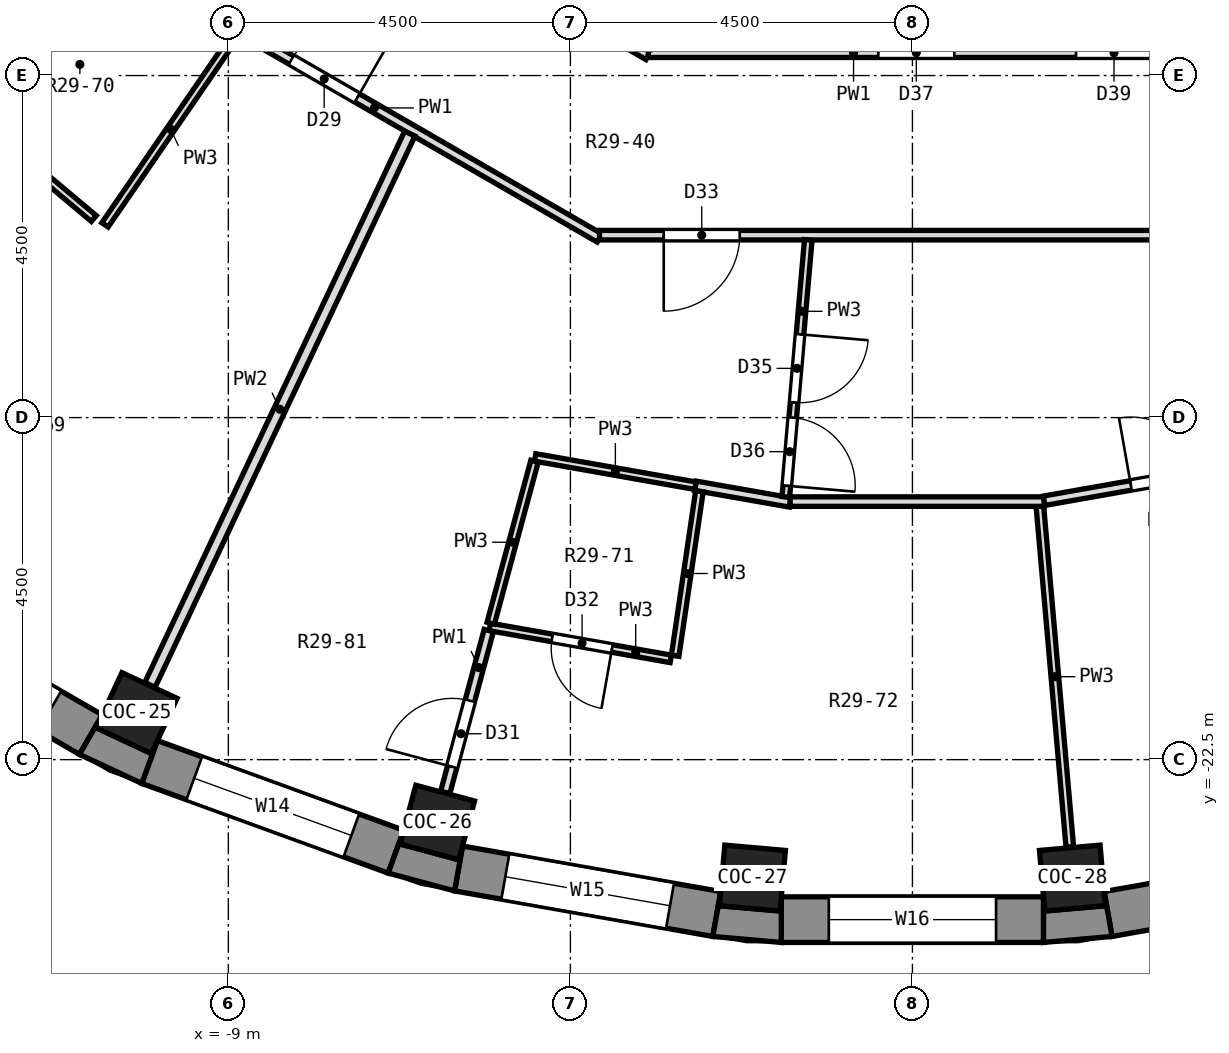
"""IFC4 building model, lengths in metres.
Left out: names, types, materials, properties, quantities, classifications, styles, units other than length and angle.
Written with IfcOpenShell. Run it as: python <this file> out.ifc"""

import sys

from ifc_helpers import new_model, si_unit, direction, frame, frame_2d, origin, origin_2d, place, context, subcontext, project, spatial, polyline, rectangle, outline, extrude, element, fill, save


model = new_model("IFC4")
c1 = context("Model", 3, precision=1e-05, world=origin(), true_north=direction((0.0, 1.0)))
c2 = subcontext(c1, "Body", "Model", "MODEL_VIEW")
j1 = project(units=[si_unit("LENGTHUNIT", "METRE"), si_unit("PLANEANGLEUNIT", "RADIAN")], contexts=[c1])
p1 = place(None, origin())
s1 = spatial("IfcSite", under=j1, at=p1, CompositionType="ELEMENT")
p2 = place(p1, origin())
s2 = spatial("IfcBuilding", under=s1, at=p2, CompositionType="ELEMENT")
p3 = place(p2, frame((0.0, 0.0, 200.4)))
s3 = spatial("IfcBuildingStorey", under=s2, at=p3, CompositionType="ELEMENT", Elevation=200.4)
for number, where, z_axis, x_axis in (
    (1, (-10.206, -21.887, 0.0), (0.0, 0.0, 1.0), (-0.423, -0.906, 0.0)),
    (2, (-6.25, -23.327, 0.0), (0.0, 0.0, 1.0), (-0.259, -0.966, 0.0)),
    (3, (-2.105, -24.058, 0.0), (0.0, 0.0, 1.0), (-0.087, -0.996, 0.0)),
    (4, (2.105, -24.058, 0.0), (0.0, 0.0, 1.0), (0.087, -0.996, 0.0)),
):
    element("IfcColumn", number, at=place(p3, frame(where, z_axis=z_axis, x_axis=x_axis)), inside=s3, PredefinedType="COLUMN", context=c2, shape_type="SweptSolid", body=[
        extrude(rectangle(XDim=0.8, YDim=0.8, at=origin_2d()), origin(), (0.0, 0.0, 1.0), 3.3),
    ])
p4 = place(p3, frame((-13.796, -20.446, 0.0), z_axis=(0.0, 0.0, 1.0), x_axis=(0.86602648383, -0.499998129301, 0.0)))
e5 = element("IfcWall", 5, at=p4, inside=s3, PredefinedType="SOLIDWALL", context=c2, shape_type="SweptSolid", body=[
    extrude(rectangle(XDim=3.45, YDim=0.6, at=frame_2d((1.725, 0.0))), origin(), (0.0, 0.0, 1.0), 2.85),
])
p5 = place(p4, frame((0.625, 0.0, 0.9)))
e6 = element("IfcOpeningElement", 6, at=p5, cuts=e5, PredefinedType="OPENING", context=c2, shape_type="SweptSolid", body=[
    extrude(rectangle(XDim=2.2, YDim=1.8, at=frame_2d((1.1, 0.9))), frame((0.0, 0.312, 0.0), z_axis=(0.0, -1.0, 0.0), x_axis=(1.0, 0.0, 0.0)), (0.0, 0.0, 1.0), 0.624),
])
p6 = place(p3, frame((-10.036, -22.531, 0.0), z_axis=(0.0, 0.0, 1.0), x_axis=(0.93968799822, -0.342032843455, 0.0)))
e7 = element("IfcWall", 7, at=p6, inside=s3, PredefinedType="SOLIDWALL", context=c2, shape_type="SweptSolid", body=[
    extrude(rectangle(XDim=3.45, YDim=0.6, at=frame_2d((1.725, 0.0))), origin(), (0.0, 0.0, 1.0), 2.85),
])
p7 = place(p6, frame((0.625, 0.0, 0.9)))
e8 = element("IfcOpeningElement", 8, at=p7, cuts=e7, PredefinedType="OPENING", context=c2, shape_type="SweptSolid", body=[
    extrude(rectangle(XDim=2.2, YDim=1.8, at=frame_2d((1.1, 0.9))), frame((0.0, 0.312, 0.0), z_axis=(0.0, -1.0, 0.0), x_axis=(1.0, 0.0, 0.0)), (0.0, 0.0, 1.0), 0.624),
])
p8 = place(p3, frame((-5.971, -23.932, 0.0), z_axis=(0.0, 0.0, 1.0), x_axis=(0.984814892183, -0.173607684551, 0.0)))
e9 = element("IfcWall", 9, at=p8, inside=s3, PredefinedType="SOLIDWALL", context=c2, shape_type="SweptSolid", body=[
    extrude(rectangle(XDim=3.45, YDim=0.6, at=frame_2d((1.725, 0.0))), origin(), (0.0, 0.0, 1.0), 2.85),
])
p9 = place(p8, frame((0.625, 0.0, 0.9)))
e10 = element("IfcOpeningElement", 10, at=p9, cuts=e9, PredefinedType="OPENING", context=c2, shape_type="SweptSolid", body=[
    extrude(rectangle(XDim=2.2, YDim=1.8, at=frame_2d((1.1, 0.9))), frame((0.0, 0.312, 0.0), z_axis=(0.0, -1.0, 0.0), x_axis=(1.0, 0.0, 0.0)), (0.0, 0.0, 1.0), 0.624),
])
p10 = place(p3, frame((-1.725, -24.605, 0.0), z_axis=(0.0, 0.0, 1.0), x_axis=(1.0, 0.0, 0.0)))
e11 = element("IfcWall", 11, at=p10, inside=s3, PredefinedType="SOLIDWALL", context=c2, shape_type="SweptSolid", body=[
    extrude(rectangle(XDim=3.45, YDim=0.6, at=frame_2d((1.725, 0.0))), origin(), (0.0, 0.0, 1.0), 2.85),
])
p11 = place(p10, frame((0.625, 0.0, 0.9)))
e12 = element("IfcOpeningElement", 12, at=p11, cuts=e11, PredefinedType="OPENING", context=c2, shape_type="SweptSolid", body=[
    extrude(rectangle(XDim=2.2, YDim=1.8, at=frame_2d((1.1, 0.9))), frame((0.0, 0.312, 0.0), z_axis=(0.0, -1.0, 0.0), x_axis=(1.0, 0.0, 0.0)), (0.0, 0.0, 1.0), 0.624),
])
p12 = place(p3, frame((2.574, -24.531, 0.0), z_axis=(0.0, 0.0, 1.0), x_axis=(0.984814892183, 0.173607684551, 0.0)))
e13 = element("IfcWall", 13, at=p12, inside=s3, PredefinedType="SOLIDWALL", context=c2, shape_type="SweptSolid", body=[
    extrude(rectangle(XDim=3.45, YDim=0.6, at=frame_2d((1.725, 0.0))), origin(), (0.0, 0.0, 1.0), 2.85),
])
p13 = place(p12, frame((0.625, 0.0, 0.9)))
e14 = element("IfcOpeningElement", 14, at=p13, cuts=e13, PredefinedType="OPENING", context=c2, shape_type="SweptSolid", body=[
    extrude(rectangle(XDim=2.2, YDim=1.8, at=frame_2d((1.1, 0.9))), frame((0.0, 0.312, 0.0), z_axis=(0.0, -1.0, 0.0), x_axis=(1.0, 0.0, 0.0)), (0.0, 0.0, 1.0), 0.624),
])
p14 = place(p3, origin())
e15 = element("IfcWall", 15, at=p14, inside=s3, PredefinedType="SOLIDWALL", context=c2, shape_type="SweptSolid", body=[
    extrude(outline(polyline([(-10.139, -22.813), (-9.934, -22.249), (-10.013, -22.419), (-10.738, -22.081), (-10.659, -21.911), (-10.959, -22.431), (-10.139, -22.813)])), origin(), (0.0, 0.0, 1.0), 2.85),
])
p15 = place(p3, origin())
e16 = element("IfcWall", 16, at=p15, inside=s3, PredefinedType="SOLIDWALL", context=c2, shape_type="SweptSolid", body=[
    extrude(outline(polyline([(-6.023, -24.227), (-5.919, -23.636), (-5.968, -23.817), (-6.74, -23.61), (-6.692, -23.429), (-6.897, -23.993), (-6.023, -24.227)])), origin(), (0.0, 0.0, 1.0), 2.85),
])
p16 = place(p3, origin())
e17 = element("IfcWall", 17, at=p16, inside=s3, PredefinedType="SOLIDWALL", context=c2, shape_type="SweptSolid", body=[
    extrude(outline(polyline([(-2.626, -24.826), (-1.725, -24.905), (-1.725, -24.305), (-1.741, -24.491), (-2.538, -24.422), (-2.522, -24.235), (-2.626, -24.826)])), origin(), (0.0, 0.0, 1.0), 2.85),
])
p17 = place(p3, origin())
e18 = element("IfcWall", 18, at=p17, inside=s3, PredefinedType="SOLIDWALL", context=c2, shape_type="SweptSolid", body=[
    extrude(outline(polyline([(1.725, -24.905), (2.626, -24.826), (2.522, -24.235), (2.538, -24.422), (1.741, -24.491), (1.725, -24.305), (1.725, -24.905)])), origin(), (0.0, 0.0, 1.0), 2.85),
])
p18 = place(p3, frame((1.677, -19.167, 0.0), z_axis=(0.0, 0.0, 1.0), x_axis=(0.087521667832, -0.996162616072, 0.0)))
e19 = element("IfcWall", 19, at=p18, inside=s3, PredefinedType="PARTITIONING", context=c2, shape_type="SweptSolid", body=[
    extrude(rectangle(XDim=4.5, YDim=0.1, at=frame_2d((2.25, 0.0))), origin(), (0.0, 0.0, 1.0), 2.85),
])
p19 = place(p3, frame((-13.239, -13.309, 0.0), z_axis=(0.0, 0.0, 1.0), x_axis=(0.76596892519, -0.642877597714, 0.0)))
e20 = element("IfcWall", 20, at=p19, inside=s3, PredefinedType="PARTITIONING", context=c2, shape_type="SweptSolid", body=[
    extrude(rectangle(XDim=3.223, YDim=0.1, at=frame_2d((1.612, 0.0))), origin(), (0.0, 0.0, 1.0), 2.85),
])
p20 = place(p3, frame((-11.366, -11.451, 0.0), z_axis=(0.0, 0.0, 1.0), x_axis=(0.866023369196, -0.500003523994, 0.0)))
e21 = element("IfcWall", 21, at=p20, inside=s3, PredefinedType="PARTITIONING", context=c2, shape_type="SweptSolid", body=[
    extrude(rectangle(XDim=8.371, YDim=0.125, at=frame_2d((4.186, 0.0))), origin(), (0.0, 0.0, 1.0), 2.85),
])
p21 = place(p20, frame((0.966, 0.0, 0.0)))
e22 = element("IfcOpeningElement", 22, at=p21, cuts=e21, PredefinedType="OPENING", context=c2, shape_type="SweptSolid", body=[
    extrude(rectangle(XDim=0.9, YDim=2.1, at=frame_2d((0.45, 1.05))), frame((0.0, 0.074, 0.0), z_axis=(0.0, -1.0, 0.0), x_axis=(1.0, 0.0, 0.0)), (0.0, 0.0, 1.0), 0.149),
])
p22 = place(p20, frame((3.688, 0.0, 0.0)))
e23 = element("IfcOpeningElement", 23, at=p22, cuts=e21, PredefinedType="OPENING", context=c2, shape_type="SweptSolid", body=[
    extrude(rectangle(XDim=1.0, YDim=2.1, at=frame_2d((0.5, 1.05))), frame((0.0, 0.074, 0.0), z_axis=(0.0, -1.0, 0.0), x_axis=(1.0, 0.0, 0.0)), (0.0, 0.0, 1.0), 0.149),
])
p23 = place(p3, frame((-9.609, -9.694, 0.0), z_axis=(0.0, 0.0, 1.0), x_axis=(0.866017984103, -0.500012851046, 0.0)))
e24 = element("IfcWall", 24, at=p23, inside=s3, PredefinedType="PARTITIONING", context=c2, shape_type="SweptSolid", body=[
    extrude(rectangle(XDim=7.083, YDim=0.125, at=frame_2d((3.542, 0.0))), origin(), (0.0, 0.0, 1.0), 2.85),
])
p24 = place(p23, frame((2.923, 0.0, 0.0)))
e25 = element("IfcOpeningElement", 25, at=p24, cuts=e24, PredefinedType="OPENING", context=c2, shape_type="SweptSolid", body=[
    extrude(rectangle(XDim=1.0, YDim=2.1, at=frame_2d((0.5, 1.05))), frame((0.0, 0.074, 0.0), z_axis=(0.0, -1.0, 0.0), x_axis=(1.0, 0.0, 0.0)), (0.0, 0.0, 1.0), 0.149),
])
p25 = place(p3, frame((-5.561, -20.754, 0.0), z_axis=(0.0, 0.0, 1.0), x_axis=(0.984794734974, -0.173721990456, 0.0)))
e26 = element("IfcWall", 26, at=p25, inside=s3, PredefinedType="PARTITIONING", context=c2, shape_type="SweptSolid", body=[
    extrude(rectangle(XDim=2.419, YDim=0.1, at=frame_2d((1.209, 0.0))), origin(), (0.0, 0.0, 1.0), 2.85),
])
p26 = place(p25, frame((0.834, 0.0, 0.0)))
e27 = element("IfcOpeningElement", 27, at=p26, cuts=e26, PredefinedType="OPENING", context=c2, shape_type="SweptSolid", body=[
    extrude(rectangle(XDim=0.8, YDim=2.1, at=frame_2d((0.4, 1.05))), frame((0.0, 0.062, 0.0), z_axis=(0.0, -1.0, 0.0), x_axis=(1.0, 0.0, 0.0)), (0.0, 0.0, 1.0), 0.124),
])
p27 = place(p3, frame((-2.855, -18.897, 0.0), z_axis=(0.0, 0.0, 1.0), x_axis=(0.984944347712, -0.17287172097, 0.0)))
e28 = element("IfcWall", 28, at=p27, inside=s3, PredefinedType="PARTITIONING", context=c2, shape_type="SweptSolid", body=[
    extrude(rectangle(XDim=1.265, YDim=0.125, at=frame_2d((0.633, 0.0))), origin(), (0.0, 0.0, 1.0), 2.85),
])
p28 = place(p3, frame((-4.963, -18.524, 0.0), z_axis=(0.0, 0.0, 1.0), x_axis=(0.984783558818, -0.173785333909, 0.0)))
e29 = element("IfcWall", 29, at=p28, inside=s3, PredefinedType="PARTITIONING", context=c2, shape_type="SweptSolid", body=[
    extrude(rectangle(XDim=2.141, YDim=0.1, at=frame_2d((1.07, 0.0))), origin(), (0.0, 0.0, 1.0), 2.85),
])
p29 = place(p3, frame((-1.608, -19.105, 0.0), z_axis=(0.0, 0.0, 1.0), x_axis=(1.0, 0.0, 0.0)))
e30 = element("IfcWall", 30, at=p29, inside=s3, PredefinedType="PARTITIONING", context=c2, shape_type="SweptSolid", body=[
    extrude(rectangle(XDim=3.343, YDim=0.125, at=frame_2d((1.671, 0.0))), origin(), (0.0, 0.0, 1.0), 2.85),
])
p30 = place(p3, frame((-4.116, -15.6, 0.0), z_axis=(0.0, 0.0, 1.0), x_axis=(1.0, 0.0, 0.0)))
e31 = element("IfcWall", 31, at=p30, inside=s3, PredefinedType="PARTITIONING", context=c2, shape_type="SweptSolid", body=[
    extrude(rectangle(XDim=8.369, YDim=0.125, at=frame_2d((4.184, 0.0))), origin(), (0.0, 0.0, 1.0), 2.85),
])
p31 = place(p30, frame((0.844, 0.0, 0.0)))
e32 = element("IfcOpeningElement", 32, at=p31, cuts=e31, PredefinedType="OPENING", context=c2, shape_type="SweptSolid", body=[
    extrude(rectangle(XDim=1.0, YDim=2.1, at=frame_2d((0.5, 1.05))), frame((0.0, 0.074, 0.0), z_axis=(0.0, -1.0, 0.0), x_axis=(1.0, 0.0, 0.0)), (0.0, 0.0, 1.0), 0.149),
])
p32 = place(p3, frame((-3.475, -13.2, 0.0), z_axis=(0.0, 0.0, 1.0), x_axis=(1.0, 0.0, 0.0)))
e33 = element("IfcWall", 33, at=p32, inside=s3, PredefinedType="PARTITIONING", context=c2, shape_type="SweptSolid", body=[
    extrude(rectangle(XDim=7.084, YDim=0.125, at=frame_2d((3.542, 0.0))), origin(), (0.0, 0.0, 1.0), 2.85),
])
p33 = place(p32, frame((3.025, 0.0, 0.0)))
e34 = element("IfcOpeningElement", 34, at=p33, cuts=e33, PredefinedType="OPENING", context=c2, shape_type="SweptSolid", body=[
    extrude(rectangle(XDim=1.0, YDim=2.1, at=frame_2d((0.5, 1.05))), frame((0.0, 0.074, 0.0), z_axis=(0.0, -1.0, 0.0), x_axis=(1.0, 0.0, 0.0)), (0.0, 0.0, 1.0), 0.149),
])
p34 = place(p32, frame((5.626, 0.0, 0.0)))
e35 = element("IfcOpeningElement", 35, at=p34, cuts=e33, PredefinedType="OPENING", context=c2, shape_type="SweptSolid", body=[
    extrude(rectangle(XDim=1.0, YDim=2.1, at=frame_2d((0.5, 1.05))), frame((0.0, 0.074, 0.0), z_axis=(0.0, -1.0, 0.0), x_axis=(1.0, 0.0, 0.0)), (0.0, 0.0, 1.0), 0.149),
])
p35 = place(p3, frame((1.732, -19.094, 0.0), z_axis=(0.0, 0.0, 1.0), x_axis=(0.984782824009, 0.173789497774, 0.0)))
e36 = element("IfcWall", 36, at=p35, inside=s3, PredefinedType="PARTITIONING", context=c2, shape_type="SweptSolid", body=[
    extrude(rectangle(XDim=3.345, YDim=0.125, at=frame_2d((1.672, 0.0))), origin(), (0.0, 0.0, 1.0), 2.85),
])
p36 = place(p35, frame((1.159, 0.0, 0.0)))
e37 = element("IfcOpeningElement", 37, at=p36, cuts=e36, PredefinedType="OPENING", context=c2, shape_type="SweptSolid", body=[
    extrude(rectangle(XDim=0.9, YDim=2.1, at=frame_2d((0.45, 1.05))), frame((0.0, 0.074, 0.0), z_axis=(0.0, -1.0, 0.0), x_axis=(1.0, 0.0, 0.0)), (0.0, 0.0, 1.0), 0.149),
])
p37 = place(p3, frame((-10.623, -15.465, 0.0), z_axis=(0.0, 0.0, 1.0), x_axis=(0.566094144379, 0.824340596902, 0.0)))
e38 = element("IfcWall", 38, at=p37, inside=s3, PredefinedType="PARTITIONING", context=c2, shape_type="SweptSolid", body=[
    extrude(rectangle(XDim=3.052, YDim=0.1, at=frame_2d((1.526, 0.0))), origin(), (0.0, 0.0, 1.0), 2.85),
])
p38 = place(p3, frame((-10.031, -21.517, 0.0), z_axis=(0.0, 0.0, 1.0), x_axis=(0.426351254657, 0.904557686194, 0.0)))
e39 = element("IfcWall", 39, at=p38, inside=s3, PredefinedType="PARTITIONING", context=c2, shape_type="SweptSolid", body=[
    extrude(rectangle(XDim=8.018, YDim=0.15, at=frame_2d((4.009, 0.0))), origin(), (0.0, 0.0, 1.0), 2.85),
])
p39 = place(p3, frame((-5.548, -20.706, 0.0), z_axis=(0.0, 0.0, 1.0), x_axis=(0.260881182377, 0.965370917669, 0.0)))
e40 = element("IfcWall", 40, at=p39, inside=s3, PredefinedType="PARTITIONING", context=c2, shape_type="SweptSolid", body=[
    extrude(rectangle(XDim=2.208, YDim=0.1, at=frame_2d((1.104, 0.0))), origin(), (0.0, 0.0, 1.0), 2.85),
])
p40 = place(p3, frame((-6.146, -22.931, 0.0), z_axis=(0.0, 0.0, 1.0), x_axis=(0.259544407095, 0.965731174161, 0.0)))
e41 = element("IfcWall", 41, at=p40, inside=s3, PredefinedType="PARTITIONING", context=c2, shape_type="SweptSolid", body=[
    extrude(rectangle(XDim=2.204, YDim=0.125, at=frame_2d((1.102, 0.0))), origin(), (0.0, 0.0, 1.0), 2.85),
])
p41 = place(p40, frame((0.349, 0.0, 0.0)))
e42 = element("IfcOpeningElement", 42, at=p41, cuts=e41, PredefinedType="OPENING", context=c2, shape_type="SweptSolid", body=[
    extrude(rectangle(XDim=0.9, YDim=2.1, at=frame_2d((0.45, 1.05))), frame((0.0, 0.074, 0.0), z_axis=(0.0, -1.0, 0.0), x_axis=(1.0, 0.0, 0.0)), (0.0, 0.0, 1.0), 0.149),
])
p42 = place(p3, frame((-3.122, -21.134, 0.0), z_axis=(0.0, 0.0, 1.0), x_axis=(0.145934022426, 0.989294324809, 0.0)))
e43 = element("IfcWall", 43, at=p42, inside=s3, PredefinedType="PARTITIONING", context=c2, shape_type="SweptSolid", body=[
    extrude(rectangle(XDim=2.188, YDim=0.1, at=frame_2d((1.094, 0.0))), origin(), (0.0, 0.0, 1.0), 2.85),
])
p43 = place(p3, frame((-1.666, -19.043, 0.0), z_axis=(0.0, 0.0, 1.0), x_axis=(0.086986657325, 0.99620947669, 0.0)))
e44 = element("IfcWall", 44, at=p43, inside=s3, PredefinedType="PARTITIONING", context=c2, shape_type="SweptSolid", body=[
    extrude(rectangle(XDim=3.393, YDim=0.1, at=frame_2d((1.697, 0.0))), origin(), (0.0, 0.0, 1.0), 2.85),
])
p44 = place(p43, frame((1.247, 0.0, 0.0)))
e45 = element("IfcOpeningElement", 45, at=p44, cuts=e44, PredefinedType="OPENING", context=c2, shape_type="SweptSolid", body=[
    extrude(rectangle(XDim=0.9, YDim=2.1, at=frame_2d((0.45, 1.05))), frame((0.0, 0.062, 0.0), z_axis=(0.0, -1.0, 0.0), x_axis=(1.0, 0.0, 0.0)), (0.0, 0.0, 1.0), 0.124),
])
p45 = place(p43, frame((0.147, 0.0, 0.0)))
e46 = element("IfcOpeningElement", 46, at=p45, cuts=e44, PredefinedType="OPENING", context=c2, shape_type="SweptSolid", body=[
    extrude(rectangle(XDim=0.9, YDim=2.1, at=frame_2d((0.45, 1.05))), frame((0.0, 0.062, 0.0), z_axis=(0.0, -1.0, 0.0), x_axis=(1.0, 0.0, 0.0)), (0.0, 0.0, 1.0), 0.124),
])
p46 = place(p5, origin())
e47 = element("IfcWindow", 47, at=p46, inside=s3, PartitioningType="SINGLE_PANEL", PredefinedType="WINDOW", context=c2, shape_type="SweptSolid", body=[
    extrude(rectangle(XDim=2.2, YDim=1.8, at=frame_2d((1.1, 0.9))), frame((0.0, 0.18, 0.0), z_axis=(0.0, -1.0, 0.0), x_axis=(1.0, 0.0, 0.0)), (0.0, 0.0, 1.0), 0.06),
])
fill(e6, e47)
p47 = place(p7, origin())
e48 = element("IfcWindow", 48, at=p47, inside=s3, PartitioningType="SINGLE_PANEL", PredefinedType="WINDOW", context=c2, shape_type="SweptSolid", body=[
    extrude(rectangle(XDim=2.2, YDim=1.8, at=frame_2d((1.1, 0.9))), frame((0.0, 0.18, 0.0), z_axis=(0.0, -1.0, 0.0), x_axis=(1.0, 0.0, 0.0)), (0.0, 0.0, 1.0), 0.06),
])
fill(e8, e48)
p48 = place(p9, origin())
e49 = element("IfcWindow", 49, at=p48, inside=s3, PartitioningType="SINGLE_PANEL", PredefinedType="WINDOW", context=c2, shape_type="SweptSolid", body=[
    extrude(rectangle(XDim=2.2, YDim=1.8, at=frame_2d((1.1, 0.9))), frame((0.0, 0.18, 0.0), z_axis=(0.0, -1.0, 0.0), x_axis=(1.0, 0.0, 0.0)), (0.0, 0.0, 1.0), 0.06),
])
fill(e10, e49)
p49 = place(p11, origin())
e50 = element("IfcWindow", 50, at=p49, inside=s3, PartitioningType="SINGLE_PANEL", PredefinedType="WINDOW", context=c2, shape_type="SweptSolid", body=[
    extrude(rectangle(XDim=2.2, YDim=1.8, at=frame_2d((1.1, 0.9))), frame((0.0, 0.18, 0.0), z_axis=(0.0, -1.0, 0.0), x_axis=(1.0, 0.0, 0.0)), (0.0, 0.0, 1.0), 0.06),
])
fill(e12, e50)
p50 = place(p22, origin())
e51 = element("IfcDoor", 51, at=p50, inside=s3, OperationType="SINGLE_SWING_RIGHT", PredefinedType="DOOR", context=c2, shape_type="SweptSolid", body=[
    extrude(rectangle(XDim=1.0, YDim=2.1, at=frame_2d((0.5, 1.05))), frame((0.0, 0.025, 0.0), z_axis=(0.0, -1.0, 0.0), x_axis=(1.0, 0.0, 0.0)), (0.0, 0.0, 1.0), 0.05),
])
fill(e23, e51)
p51 = place(p41, origin())
e52 = element("IfcDoor", 52, at=p51, inside=s3, OperationType="SINGLE_SWING_LEFT", PredefinedType="DOOR", context=c2, shape_type="SweptSolid", body=[
    extrude(rectangle(XDim=0.9, YDim=2.1, at=frame_2d((0.45, 1.05))), frame((0.0, 0.025, 0.0), z_axis=(0.0, -1.0, 0.0), x_axis=(1.0, 0.0, 0.0)), (0.0, 0.0, 1.0), 0.05),
])
fill(e42, e52)
p52 = place(p26, frame((0.8, 0.0, 0.0), z_axis=(0.0, 0.0, 1.0), x_axis=(-1.0, 0.0, 0.0)))
e53 = element("IfcDoor", 53, at=p52, inside=s3, OperationType="SINGLE_SWING_LEFT", PredefinedType="DOOR", context=c2, shape_type="SweptSolid", body=[
    extrude(rectangle(XDim=0.8, YDim=2.1, at=frame_2d((0.4, 1.05))), frame((0.0, 0.025, 0.0), z_axis=(0.0, -1.0, 0.0), x_axis=(1.0, 0.0, 0.0)), (0.0, 0.0, 1.0), 0.05),
])
fill(e27, e53)
p53 = place(p31, frame((1.0, 0.0, 0.0), z_axis=(0.0, 0.0, 1.0), x_axis=(-1.0, 0.0, 0.0)))
e54 = element("IfcDoor", 54, at=p53, inside=s3, OperationType="SINGLE_SWING_RIGHT", PredefinedType="DOOR", context=c2, shape_type="SweptSolid", body=[
    extrude(rectangle(XDim=1.0, YDim=2.1, at=frame_2d((0.5, 1.05))), frame((0.0, 0.025, 0.0), z_axis=(0.0, -1.0, 0.0), x_axis=(1.0, 0.0, 0.0)), (0.0, 0.0, 1.0), 0.05),
])
fill(e32, e54)
p54 = place(p44, frame((0.9, 0.0, 0.0), z_axis=(0.0, 0.0, 1.0), x_axis=(-1.0, 0.0, 0.0)))
e55 = element("IfcDoor", 55, at=p54, inside=s3, OperationType="SINGLE_SWING_LEFT", PredefinedType="DOOR", context=c2, shape_type="SweptSolid", body=[
    extrude(rectangle(XDim=0.9, YDim=2.1, at=frame_2d((0.45, 1.05))), frame((0.0, 0.025, 0.0), z_axis=(0.0, -1.0, 0.0), x_axis=(1.0, 0.0, 0.0)), (0.0, 0.0, 1.0), 0.05),
])
fill(e45, e55)
p55 = place(p45, frame((0.9, 0.0, 0.0), z_axis=(0.0, 0.0, 1.0), x_axis=(-1.0, 0.0, 0.0)))
e56 = element("IfcDoor", 56, at=p55, inside=s3, OperationType="SINGLE_SWING_RIGHT", PredefinedType="DOOR", context=c2, shape_type="SweptSolid", body=[
    extrude(rectangle(XDim=0.9, YDim=2.1, at=frame_2d((0.45, 1.05))), frame((0.0, 0.025, 0.0), z_axis=(0.0, -1.0, 0.0), x_axis=(1.0, 0.0, 0.0)), (0.0, 0.0, 1.0), 0.05),
])
fill(e46, e56)
p56 = place(p33, origin())
e57 = element("IfcDoor", 57, at=p56, inside=s3, OperationType="SINGLE_SWING_LEFT", PredefinedType="DOOR", context=c2, shape_type="SweptSolid", body=[
    extrude(rectangle(XDim=1.0, YDim=2.1, at=frame_2d((0.5, 1.05))), frame((0.0, 0.025, 0.0), z_axis=(0.0, -1.0, 0.0), x_axis=(1.0, 0.0, 0.0)), (0.0, 0.0, 1.0), 0.05),
])
fill(e34, e57)
p57 = place(p36, origin())
e58 = element("IfcDoor", 58, at=p57, inside=s3, OperationType="SINGLE_SWING_LEFT", PredefinedType="DOOR", context=c2, shape_type="SweptSolid", body=[
    extrude(rectangle(XDim=0.9, YDim=2.1, at=frame_2d((0.45, 1.05))), frame((0.0, 0.025, 0.0), z_axis=(0.0, -1.0, 0.0), x_axis=(1.0, 0.0, 0.0)), (0.0, 0.0, 1.0), 0.05),
])
fill(e37, e58)
p58 = place(p34, origin())
e59 = element("IfcDoor", 59, at=p58, inside=s3, OperationType="SINGLE_SWING_RIGHT", PredefinedType="DOOR", context=c2, shape_type="SweptSolid", body=[
    extrude(rectangle(XDim=1.0, YDim=2.1, at=frame_2d((0.5, 1.05))), frame((0.0, 0.025, 0.0), z_axis=(0.0, -1.0, 0.0), x_axis=(1.0, 0.0, 0.0)), (0.0, 0.0, 1.0), 0.05),
])
fill(e35, e59)
save(model, sys.argv[1])
